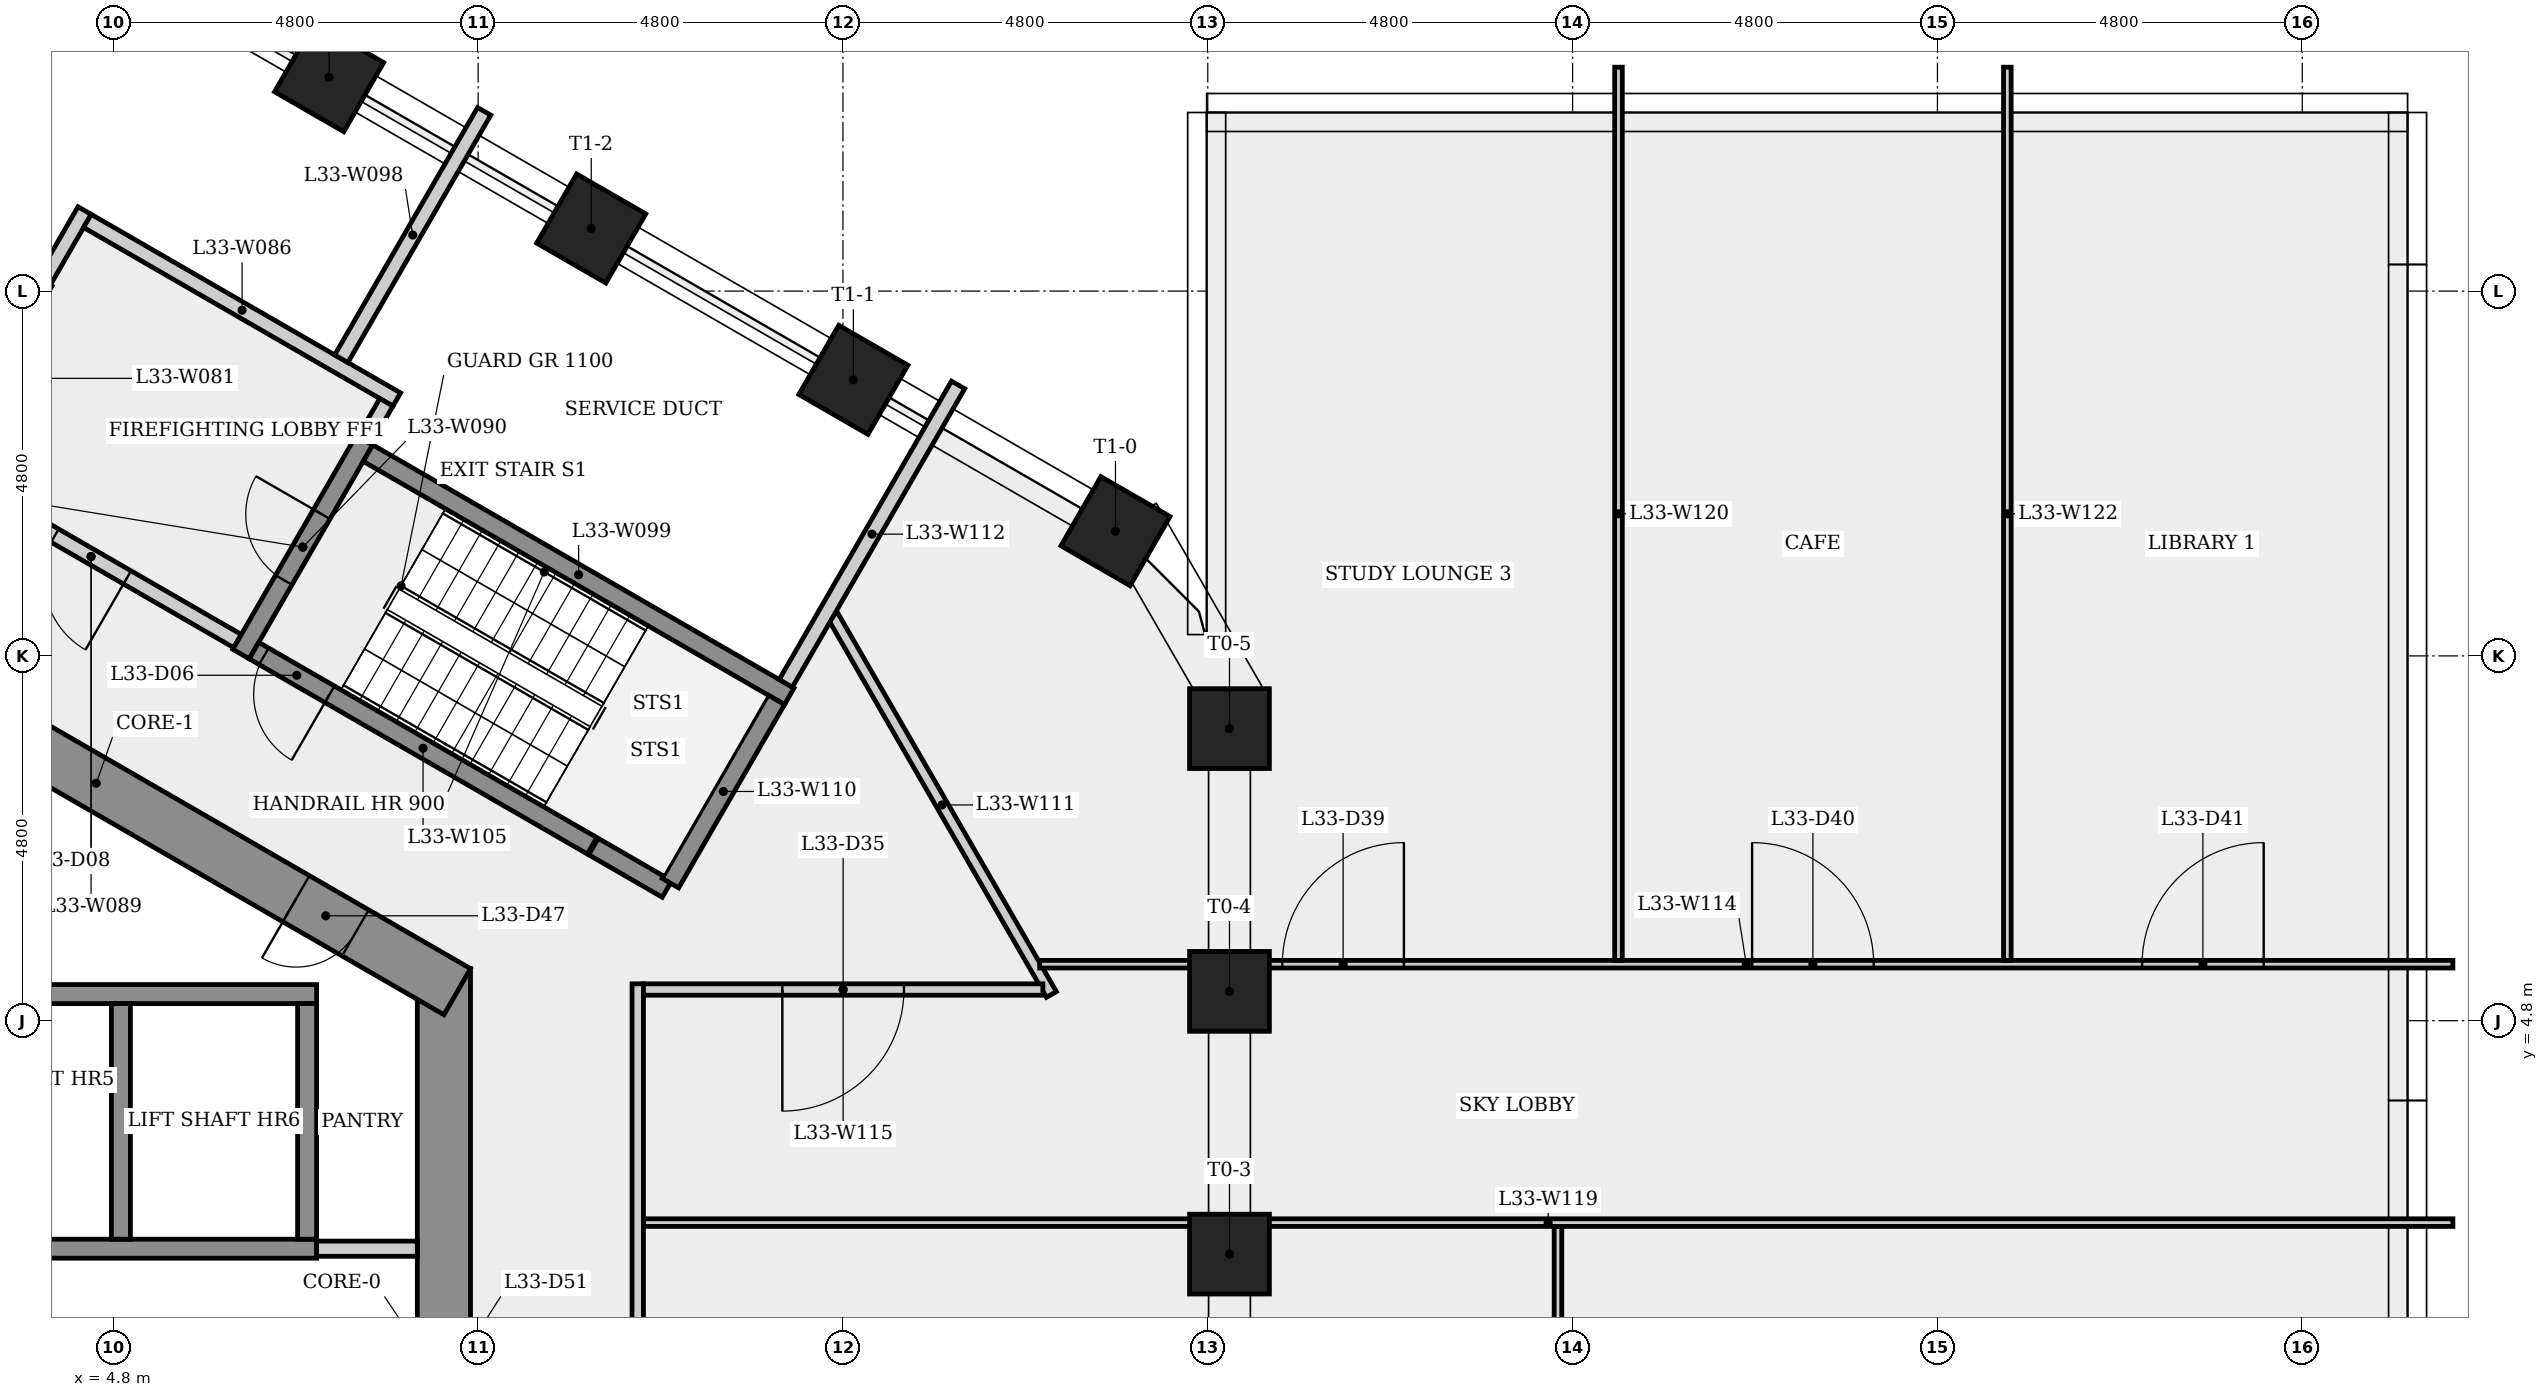
"""IFC4 building model, lengths in metres.
Left out: names, types, materials, properties, quantities, classifications, styles, units other than length and angle.
Written with IfcOpenShell. Run it as: python <this file> out.ifc"""

import sys

from ifc_helpers import new_model, si_unit, direction, frame, frame_2d, origin, origin_2d, place, context, subcontext, project, spatial, rectangle, extrude, element, fill, save


model = new_model("IFC4")
c1 = context("Model", 3, precision=1e-05, world=origin(), true_north=direction((0.0, 1.0)))
c2 = subcontext(c1, "Body", "Model", "MODEL_VIEW")
j1 = project(units=[si_unit("LENGTHUNIT", "METRE"), si_unit("PLANEANGLEUNIT", "RADIAN")], contexts=[c1])
p1 = place(None, origin())
s1 = spatial("IfcSite", under=j1, at=p1, CompositionType="ELEMENT")
p2 = place(p1, origin())
s2 = spatial("IfcBuilding", under=s1, at=p2, CompositionType="ELEMENT")
p3 = place(p2, frame((0.0, 0.0, 124.5)))
s3 = spatial("IfcBuildingStorey", under=s2, at=p3, CompositionType="ELEMENT", Elevation=124.5)
p4 = place(p3, frame((9.15, -5.485, 0.0), z_axis=(0.0, 0.0, 1.0), x_axis=(0.0, 1.0, 0.0)))
e1 = element("IfcWall", 1, at=p4, inside=s3, PredefinedType="SHEAR", context=c2, shape_type="SweptSolid", body=[
    extrude(rectangle(XDim=10.97, YDim=0.7, at=frame_2d((5.485, 0.0))), origin(), (0.0, 0.0, 1.0), 4.0),
])
p5 = place(p4, frame((4.685, 0.0, 0.0)))
e2 = element("IfcOpeningElement", 2, at=p5, cuts=e1, PredefinedType="OPENING", context=c2, shape_type="SweptSolid", body=[
    extrude(rectangle(XDim=1.6, YDim=2.1, at=frame_2d((0.8, 1.05))), frame((0.0, 0.36, 0.0), z_axis=(0.0, -1.0, 0.0), x_axis=(1.0, 0.0, 0.0)), (0.0, 0.0, 1.0), 0.72),
])
p6 = place(p3, frame((9.325, 5.182, 0.0), z_axis=(0.0, 0.0, 1.0), x_axis=(-0.866023993627, 0.500002442456, 0.0)))
e3 = element("IfcWall", 3, at=p6, inside=s3, PredefinedType="SHEAR", context=c2, shape_type="SweptSolid", body=[
    extrude(rectangle(XDim=10.97, YDim=0.7, at=frame_2d((5.485, 0.0))), origin(), (0.0, 0.0, 1.0), 4.0),
])
p7 = place(p6, frame((8.267, 0.0, 0.0)))
e4 = element("IfcOpeningElement", 4, at=p7, cuts=e3, PredefinedType="OPENING", context=c2, shape_type="SweptSolid", body=[
    extrude(rectangle(XDim=0.9, YDim=2.1, at=frame_2d((0.45, 1.05))), frame((0.0, 0.36, 0.0), z_axis=(0.0, -1.0, 0.0), x_axis=(1.0, 0.0, 0.0)), (0.0, 0.0, 1.0), 0.72),
])
p8 = place(p6, frame((1.547, 0.0, 0.0)))
e5 = element("IfcOpeningElement", 5, at=p8, cuts=e3, PredefinedType="OPENING", context=c2, shape_type="SweptSolid", body=[
    extrude(rectangle(XDim=0.9, YDim=2.1, at=frame_2d((0.45, 1.05))), frame((0.0, 0.36, 0.0), z_axis=(0.0, -1.0, 0.0), x_axis=(1.0, 0.0, 0.0)), (0.0, 0.0, 1.0), 0.72),
])
for number, where, z_axis, x_axis in (
    (6, (19.486, 1.729, 0.0), (0.0, 0.0, 1.0), (1.0, 0.0, 0.0)),
    (7, (19.486, 5.186, 0.0), (0.0, 0.0, 1.0), (1.0, 0.0, 0.0)),
    (8, (19.486, 8.643, 0.0), (0.0, 0.0, 1.0), (1.0, 0.0, 0.0)),
    (9, (17.986, 11.241, 0.0), (0.0, 0.0, 1.0), (0.5, 0.866, 0.0)),
    (10, (14.537, 13.232, 0.0), (0.0, 0.0, 1.0), (0.5, 0.866, 0.0)),
    (11, (11.088, 15.223, 0.0), (0.0, 0.0, 1.0), (0.5, 0.866, 0.0)),
    (12, (7.64, 17.214, 0.0), (0.0, 0.0, 1.0), (0.5, 0.866, 0.0)),
):
    element("IfcColumn", number, at=place(p3, frame(where, z_axis=z_axis, x_axis=x_axis)), inside=s3, PredefinedType="COLUMN", context=c2, shape_type="SweptSolid", body=[
        extrude(rectangle(XDim=1.05, YDim=1.05, at=origin_2d()), origin(), (0.0, 0.0, 1.0), 4.0),
    ])
p9 = place(p3, frame((-7.475, 1.8, 0.0), z_axis=(0.0, 0.0, 1.0), x_axis=(1.0, 0.0, 0.0)))
e13 = element("IfcWall", 13, at=p9, inside=s3, PredefinedType="SHEAR", context=c2, shape_type="SweptSolid", body=[
    extrude(rectangle(XDim=14.95, YDim=0.25, at=frame_2d((7.475, 0.0))), origin(), (0.0, 0.0, 1.0), 3.6),
])
p10 = place(p3, frame((-7.225, 5.15, 0.0), z_axis=(0.0, 0.0, 1.0), x_axis=(1.0, 0.0, 0.0)))
e14 = element("IfcWall", 14, at=p10, inside=s3, PredefinedType="SHEAR", context=c2, shape_type="SweptSolid", body=[
    extrude(rectangle(XDim=14.7, YDim=0.25, at=frame_2d((7.35, 0.0))), origin(), (0.0, 0.0, 1.0), 3.6),
])
p11 = place(p3, frame((3.885, 14.529, 0.0), z_axis=(0.0, 0.0, 1.0), x_axis=(0.499997628298, 0.866026773083, 0.0)))
e15 = element("IfcWall", 15, at=p11, inside=s3, PredefinedType="PLUMBINGWALL", context=c2, shape_type="SweptSolid", body=[
    extrude(rectangle(XDim=1.075, YDim=0.2, at=frame_2d((0.538, 0.0))), origin(), (0.0, 0.0, 1.0), 3.6),
])
p12 = place(p3, frame((4.459, 15.323, 0.0), z_axis=(0.0, 0.0, 1.0), x_axis=(0.866016039709, -0.500016218704, 0.0)))
e16 = element("IfcWall", 16, at=p12, inside=s3, PredefinedType="PLUMBINGWALL", context=c2, shape_type="SweptSolid", body=[
    extrude(rectangle(XDim=4.7, YDim=0.2, at=frame_2d((2.35, 0.0))), origin(), (0.0, 0.0, 1.0), 3.6),
])
p13 = place(p3, frame((4.9, 5.025, 0.0), z_axis=(0.0, 0.0, 1.0), x_axis=(0.0, -1.0, 0.0)))
e17 = element("IfcWall", 17, at=p13, inside=s3, PredefinedType="SHEAR", context=c2, shape_type="SweptSolid", body=[
    extrude(rectangle(XDim=3.1, YDim=0.25, at=frame_2d((1.55, 0.0))), origin(), (0.0, 0.0, 1.0), 4.0),
])
p14 = place(p3, frame((6.435, 9.795, 0.0), z_axis=(0.0, 0.0, 1.0), x_axis=(-0.866012907634, 0.500021643343, 0.0)))
e18 = element("IfcWall", 18, at=p14, inside=s3, PredefinedType="PARTITIONING", context=c2, shape_type="SweptSolid", body=[
    extrude(rectangle(XDim=4.45, YDim=0.2, at=frame_2d((2.225, 0.0))), origin(), (0.0, 0.0, 1.0), 3.6),
])
p15 = place(p14, frame((1.675, 0.0, 0.0)))
e19 = element("IfcOpeningElement", 19, at=p15, cuts=e18, PredefinedType="OPENING", context=c2, shape_type="SweptSolid", body=[
    extrude(rectangle(XDim=1.1, YDim=2.1, at=frame_2d((0.55, 1.05))), frame((0.0, 0.11, 0.0), z_axis=(0.0, -1.0, 0.0), x_axis=(1.0, 0.0, 0.0)), (0.0, 0.0, 1.0), 0.22),
])
p16 = place(p3, frame((6.48, 9.624, 0.0), z_axis=(0.0, 0.0, 1.0), x_axis=(0.500017246033, 0.866015446554, 0.0)))
e20 = element("IfcWall", 20, at=p16, inside=s3, PredefinedType="SHEAR", context=c2, shape_type="SweptSolid", body=[
    extrude(rectangle(XDim=3.25, YDim=0.25, at=frame_2d((1.625, 0.0))), origin(), (0.0, 0.0, 1.0), 3.6),
])
p17 = place(p16, frame((1.125, 0.0, 0.0)))
e21 = element("IfcOpeningElement", 21, at=p17, cuts=e20, PredefinedType="OPENING", context=c2, shape_type="SweptSolid", body=[
    extrude(rectangle(XDim=1.0, YDim=2.1, at=frame_2d((0.5, 1.05))), frame((0.0, 0.135, 0.0), z_axis=(0.0, -1.0, 0.0), x_axis=(1.0, 0.0, 0.0)), (0.0, 0.0, 1.0), 0.27),
])
p18 = place(p3, frame((7.475, 1.8, 0.0), z_axis=(0.0, 0.0, 1.0), x_axis=(1.0, 0.0, 0.0)))
e22 = element("IfcWall", 22, at=p18, inside=s3, PredefinedType="PARTITIONING", context=c2, shape_type="SweptSolid", body=[
    extrude(rectangle(XDim=1.325, YDim=0.2, at=frame_2d((0.663, 0.0))), origin(), (0.0, 0.0, 1.0), 3.6),
])
p19 = place(p3, frame((7.35, 5.025, 0.0), z_axis=(0.0, 0.0, 1.0), x_axis=(0.0, -1.0, 0.0)))
e23 = element("IfcWall", 23, at=p19, inside=s3, PredefinedType="SHEAR", context=c2, shape_type="SweptSolid", body=[
    extrude(rectangle(XDim=3.1, YDim=0.25, at=frame_2d((1.55, 0.0))), origin(), (0.0, 0.0, 1.0), 4.0),
])
p20 = place(p3, frame((7.8, 13.51, 0.0), z_axis=(0.0, 0.0, 1.0), x_axis=(0.499981075744, 0.866036329433, 0.0)))
e24 = element("IfcWall", 24, at=p20, inside=s3, PredefinedType="PLUMBINGWALL", context=c2, shape_type="SweptSolid", body=[
    extrude(rectangle(XDim=3.759, YDim=0.2, at=frame_2d((1.879, 0.0))), origin(), (0.0, 0.0, 1.0), 3.6),
])
p21 = place(p3, frame((8.151, 12.268, 0.0), z_axis=(0.0, 0.0, 1.0), x_axis=(0.866025499775, -0.499999833739, 0.0)))
e25 = element("IfcWall", 25, at=p21, inside=s3, PredefinedType="SHEAR", context=c2, shape_type="SweptSolid", body=[
    extrude(rectangle(XDim=6.4, YDim=0.25, at=frame_2d((3.2, 0.0))), origin(), (0.0, 0.0, 1.0), 3.6),
])
p22 = place(p3, frame((8.393, 12.937, 0.0), z_axis=(0.0, 0.0, 1.0), x_axis=(-0.500065409566, -0.86598763626, 0.0)))
e26 = element("IfcWall", 26, at=p22, inside=s3, PredefinedType="PLUMBINGWALL", context=c2, shape_type="SweptSolid", body=[
    extrude(rectangle(XDim=0.575, YDim=0.2, at=frame_2d((0.288, 0.0))), origin(), (0.0, 0.0, 1.0), 3.6),
])
p23 = place(p3, frame((11.1, 7.101, 0.0), z_axis=(0.0, 0.0, 1.0), x_axis=(-0.8660265141, 0.499998076872, 0.0)))
e27 = element("IfcWall", 27, at=p23, inside=s3, PredefinedType="SHEAR", context=c2, shape_type="SweptSolid", body=[
    extrude(rectangle(XDim=5.137, YDim=0.25, at=frame_2d((2.569, 0.0))), origin(), (0.0, 0.0, 1.0), 3.6),
])
p24 = place(p23, frame((3.987, 0.0, 0.0)))
e28 = element("IfcOpeningElement", 28, at=p24, cuts=e27, PredefinedType="OPENING", context=c2, shape_type="SweptSolid", body=[
    extrude(rectangle(XDim=1.0, YDim=2.1, at=frame_2d((0.5, 1.05))), frame((0.0, 0.135, 0.0), z_axis=(0.0, -1.0, 0.0), x_axis=(1.0, 0.0, 0.0)), (0.0, 0.0, 1.0), 0.27),
])
p25 = place(p3, frame((11.7, -5.135, 0.0), z_axis=(0.0, 0.0, 1.0), x_axis=(0.0, 1.0, 0.0)))
e29 = element("IfcWall", 29, at=p25, inside=s3, PredefinedType="PARTITIONING", context=c2, shape_type="SweptSolid", body=[
    extrude(rectangle(XDim=10.42, YDim=0.15, at=frame_2d((5.21, 0.0))), origin(), (0.0, 0.0, 1.0), 3.6),
])
p26 = place(p3, frame((12.085, 6.532, 0.0), z_axis=(0.0, 0.0, 1.0), x_axis=(-0.86604373436, 0.499968249168, 0.0)))
e30 = element("IfcWall", 30, at=p26, inside=s3, PredefinedType="SHEAR", context=c2, shape_type="SweptSolid", body=[
    extrude(rectangle(XDim=1.118, YDim=0.25, at=frame_2d((0.559, 0.0))), origin(), (0.0, 0.0, 1.0), 3.6),
])
p27 = place(p3, frame((13.523, 9.022, 0.0), z_axis=(0.0, 0.0, 1.0), x_axis=(-0.500013277472, -0.866017737897, 0.0)))
e31 = element("IfcWall", 31, at=p27, inside=s3, PredefinedType="SHEAR", context=c2, shape_type="SweptSolid", body=[
    extrude(rectangle(XDim=2.786, YDim=0.25, at=frame_2d((1.393, 0.0))), origin(), (0.0, 0.0, 1.0), 3.6),
])
p28 = place(p3, frame((14.264, 10.132, 0.0), z_axis=(0.0, 0.0, 1.0), x_axis=(0.500001380108, -0.866024606977, 0.0)))
e32 = element("IfcWall", 32, at=p28, inside=s3, PredefinedType="PARTITIONING", context=c2, shape_type="SweptSolid", body=[
    extrude(rectangle(XDim=5.758, YDim=0.15, at=frame_2d((2.879, 0.0))), origin(), (0.0, 0.0, 1.0), 3.6),
])
p29 = place(p3, frame((13.648, 9.239, 0.0), z_axis=(0.0, 0.0, 1.0), x_axis=(0.499978822259, 0.866037630414, 0.0)))
e33 = element("IfcWall", 33, at=p29, inside=s3, PredefinedType="PLUMBINGWALL", context=c2, shape_type="SweptSolid", body=[
    extrude(rectangle(XDim=4.534, YDim=0.2, at=frame_2d((2.267, 0.0))), origin(), (0.0, 0.0, 1.0), 3.6),
])
p30 = place(p3, frame((16.988, 5.543, 0.0), z_axis=(0.0, 0.0, 1.0), x_axis=(1.0, 0.0, 0.0)))
e34 = element("IfcWall", 34, at=p30, inside=s3, PredefinedType="PARTITIONING", context=c2, shape_type="SweptSolid", body=[
    extrude(rectangle(XDim=18.594, YDim=0.1, at=frame_2d((9.297, 0.0))), origin(), (0.0, 0.0, 1.0), 3.6),
])
p31 = place(p30, frame((3.193, 0.0, 0.0)))
e35 = element("IfcOpeningElement", 35, at=p31, cuts=e34, PredefinedType="OPENING", context=c2, shape_type="SweptSolid", body=[
    extrude(rectangle(XDim=1.6, YDim=2.1, at=frame_2d((0.8, 1.05))), frame((0.0, 0.06, 0.0), z_axis=(0.0, -1.0, 0.0), x_axis=(1.0, 0.0, 0.0)), (0.0, 0.0, 1.0), 0.12),
])
p32 = place(p30, frame((9.374, 0.0, 0.0)))
e36 = element("IfcOpeningElement", 36, at=p32, cuts=e34, PredefinedType="OPENING", context=c2, shape_type="SweptSolid", body=[
    extrude(rectangle(XDim=1.6, YDim=2.1, at=frame_2d((0.8, 1.05))), frame((0.0, 0.06, 0.0), z_axis=(0.0, -1.0, 0.0), x_axis=(1.0, 0.0, 0.0)), (0.0, 0.0, 1.0), 0.12),
])
p33 = place(p30, frame((14.505, 0.0, 0.0)))
e37 = element("IfcOpeningElement", 37, at=p33, cuts=e34, PredefinedType="OPENING", context=c2, shape_type="SweptSolid", body=[
    extrude(rectangle(XDim=1.6, YDim=2.1, at=frame_2d((0.8, 1.05))), frame((0.0, 0.06, 0.0), z_axis=(0.0, -1.0, 0.0), x_axis=(1.0, 0.0, 0.0)), (0.0, 0.0, 1.0), 0.12),
])
p34 = place(p3, frame((17.03, 5.21, 0.0), z_axis=(0.0, 0.0, 1.0), x_axis=(-1.0, 0.0, 0.0)))
e38 = element("IfcWall", 38, at=p34, inside=s3, PredefinedType="PARTITIONING", context=c2, shape_type="SweptSolid", body=[
    extrude(rectangle(XDim=5.255, YDim=0.15, at=frame_2d((2.628, 0.0))), origin(), (0.0, 0.0, 1.0), 3.6),
])
p35 = place(p34, frame((1.828, 0.0, 0.0)))
e39 = element("IfcOpeningElement", 39, at=p35, cuts=e38, PredefinedType="OPENING", context=c2, shape_type="SweptSolid", body=[
    extrude(rectangle(XDim=1.6, YDim=2.1, at=frame_2d((0.8, 1.05))), frame((0.0, 0.085, 0.0), z_axis=(0.0, -1.0, 0.0), x_axis=(1.0, 0.0, 0.0)), (0.0, 0.0, 1.0), 0.17),
])
p36 = place(p3, frame((23.807, 2.093, 0.0), z_axis=(0.0, 0.0, 1.0), x_axis=(0.0, -1.0, 0.0)))
e40 = element("IfcWall", 40, at=p36, inside=s3, PredefinedType="PARTITIONING", context=c2, shape_type="SweptSolid", body=[
    extrude(rectangle(XDim=6.587, YDim=0.1, at=frame_2d((3.293, 0.0))), origin(), (0.0, 0.0, 1.0), 3.6),
])
p37 = place(p3, frame((11.775, 2.143, 0.0), z_axis=(0.0, 0.0, 1.0), x_axis=(1.0, 0.0, 0.0)))
e41 = element("IfcWall", 41, at=p37, inside=s3, PredefinedType="PARTITIONING", context=c2, shape_type="SweptSolid", body=[
    extrude(rectangle(XDim=23.807, YDim=0.1, at=frame_2d((11.903, 0.0))), origin(), (0.0, 0.0, 1.0), 3.6),
])
for number, where, z_axis, x_axis in (
    (42, (24.604, 17.346, 0.0), (0.0, 0.0, 1.0), (0.0, -1.0, 0.0)),
    (43, (29.719, 17.346, 0.0), (0.0, 0.0, 1.0), (0.0, -1.0, 0.0)),
):
    element("IfcWall", number, at=place(p3, frame(where, z_axis=z_axis, x_axis=x_axis)), inside=s3, PredefinedType="PARTITIONING", context=c2, shape_type="SweptSolid", body=[
        extrude(rectangle(XDim=11.753, YDim=0.1, at=frame_2d((5.876, 0.0))), origin(), (0.0, 0.0, 1.0), 3.6),
    ])
p38 = place(p24, origin())
e44 = element("IfcDoor", 44, at=p38, inside=s3, OperationType="SINGLE_SWING_LEFT", PredefinedType="DOOR", context=c2, shape_type="SweptSolid", body=[
    extrude(rectangle(XDim=1.0, YDim=2.1, at=frame_2d((0.5, 1.05))), frame((0.0, 0.025, 0.0), z_axis=(0.0, -1.0, 0.0), x_axis=(1.0, 0.0, 0.0)), (0.0, 0.0, 1.0), 0.05),
])
fill(e28, e44)
p39 = place(p17, origin())
e45 = element("IfcDoor", 45, at=p39, inside=s3, OperationType="SINGLE_SWING_RIGHT", PredefinedType="DOOR", context=c2, shape_type="SweptSolid", body=[
    extrude(rectangle(XDim=1.0, YDim=2.1, at=frame_2d((0.5, 1.05))), frame((0.0, 0.025, 0.0), z_axis=(0.0, -1.0, 0.0), x_axis=(1.0, 0.0, 0.0)), (0.0, 0.0, 1.0), 0.05),
])
fill(e21, e45)
p40 = place(p15, origin())
e46 = element("IfcDoor", 46, at=p40, inside=s3, OperationType="SINGLE_SWING_LEFT", PredefinedType="DOOR", context=c2, shape_type="SweptSolid", body=[
    extrude(rectangle(XDim=1.1, YDim=2.1, at=frame_2d((0.55, 1.05))), frame((0.0, 0.025, 0.0), z_axis=(0.0, -1.0, 0.0), x_axis=(1.0, 0.0, 0.0)), (0.0, 0.0, 1.0), 0.05),
])
fill(e19, e46)
p41 = place(p35, origin())
e47 = element("IfcDoor", 47, at=p41, inside=s3, OperationType="SINGLE_SWING_RIGHT", PredefinedType="DOOR", context=c2, shape_type="SweptSolid", body=[
    extrude(rectangle(XDim=1.6, YDim=2.1, at=frame_2d((0.8, 1.05))), frame((0.0, 0.025, 0.0), z_axis=(0.0, -1.0, 0.0), x_axis=(1.0, 0.0, 0.0)), (0.0, 0.0, 1.0), 0.05),
])
fill(e39, e47)
p42 = place(p31, origin())
e48 = element("IfcDoor", 48, at=p42, inside=s3, OperationType="SINGLE_SWING_RIGHT", PredefinedType="DOOR", context=c2, shape_type="SweptSolid", body=[
    extrude(rectangle(XDim=1.6, YDim=2.1, at=frame_2d((0.8, 1.05))), frame((0.0, 0.025, 0.0), z_axis=(0.0, -1.0, 0.0), x_axis=(1.0, 0.0, 0.0)), (0.0, 0.0, 1.0), 0.05),
])
fill(e35, e48)
p43 = place(p32, origin())
e49 = element("IfcDoor", 49, at=p43, inside=s3, OperationType="SINGLE_SWING_LEFT", PredefinedType="DOOR", context=c2, shape_type="SweptSolid", body=[
    extrude(rectangle(XDim=1.6, YDim=2.1, at=frame_2d((0.8, 1.05))), frame((0.0, 0.025, 0.0), z_axis=(0.0, -1.0, 0.0), x_axis=(1.0, 0.0, 0.0)), (0.0, 0.0, 1.0), 0.05),
])
fill(e36, e49)
p44 = place(p33, origin())
e50 = element("IfcDoor", 50, at=p44, inside=s3, OperationType="SINGLE_SWING_RIGHT", PredefinedType="DOOR", context=c2, shape_type="SweptSolid", body=[
    extrude(rectangle(XDim=1.6, YDim=2.1, at=frame_2d((0.8, 1.05))), frame((0.0, 0.025, 0.0), z_axis=(0.0, -1.0, 0.0), x_axis=(1.0, 0.0, 0.0)), (0.0, 0.0, 1.0), 0.05),
])
fill(e37, e50)
p45 = place(p8, origin())
e51 = element("IfcDoor", 51, at=p45, inside=s3, OperationType="SINGLE_SWING_RIGHT", PredefinedType="DOOR", context=c2, shape_type="SweptSolid", body=[
    extrude(rectangle(XDim=0.9, YDim=2.1, at=frame_2d((0.45, 1.05))), frame((0.0, 0.025, 0.0), z_axis=(0.0, -1.0, 0.0), x_axis=(1.0, 0.0, 0.0)), (0.0, 0.0, 1.0), 0.05),
])
fill(e5, e51)
save(model, sys.argv[1])
